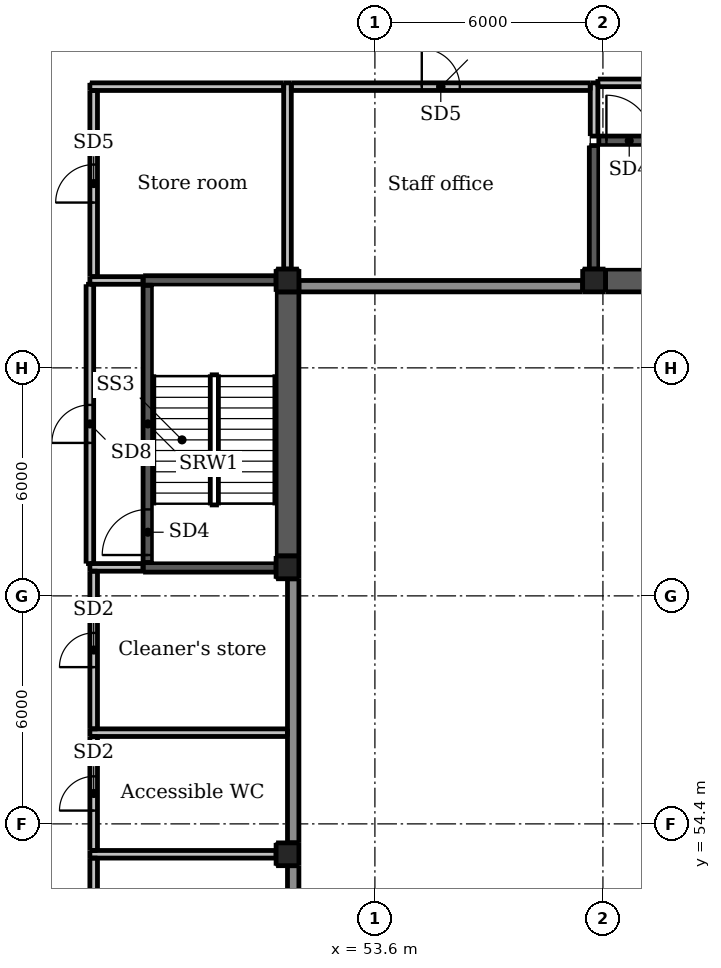
"""IFC4 building model, lengths in metres.
Left out: names, types, materials, properties, quantities, classifications, styles, units other than length and angle.
Written with IfcOpenShell. Run it as: python <this file> out.ifc"""

import sys

from ifc_helpers import new_model, si_unit, direction, frame, frame_2d, origin, origin_2d, place, context, subcontext, project, spatial, rectangle, extrude, element, fill, save


model = new_model("IFC4")
c1 = context("Model", 3, precision=1e-05, world=origin(), true_north=direction((0.0, 1.0)))
c2 = subcontext(c1, "Body", "Model", "MODEL_VIEW")
j1 = project(units=[si_unit("LENGTHUNIT", "METRE"), si_unit("PLANEANGLEUNIT", "RADIAN")], contexts=[c1])
p1 = place(None, origin())
s1 = spatial("IfcSite", under=j1, at=p1, CompositionType="ELEMENT")
p2 = place(p1, origin())
s2 = spatial("IfcBuilding", under=s1, at=p2, CompositionType="ELEMENT")
p3 = place(p2, frame((0.0, 0.0, 19.0)))
s3 = spatial("IfcBuildingStorey", under=s2, at=p3, CompositionType="ELEMENT", Elevation=19.0)
for number, where, z_axis, x_axis in (
    (1, (59.6, 67.4, 0.0), (0.0, 0.0, 1.0), (1.0, 0.0, 0.0)),
    (2, (52.6, 54.4, 0.0), (0.0, 0.0, 1.0), (1.0, 0.0, 0.0)),
    (3, (52.6, 60.4, 0.0), (0.0, 0.0, 1.0), (1.0, 0.0, 0.0)),
):
    element("IfcColumn", number, at=place(p3, frame(where, z_axis=z_axis, x_axis=x_axis)), inside=s3, PredefinedType="COLUMN", context=c2, shape_type="SweptSolid", body=[
        extrude(rectangle(XDim=1.2, YDim=1.2, at=origin_2d()), origin(), (0.0, 0.0, 1.0), 4.25),
    ])
p4 = place(p3, frame((55.2, 64.8, 0.0), z_axis=(0.0, 0.0, 1.0), x_axis=(1.0, 0.0, 0.0)))
e4 = element("IfcColumn", 4, at=p4, inside=s3, PredefinedType="COLUMN", context=c2, shape_type="SweptSolid", body=[
    extrude(rectangle(XDim=3.2, YDim=3.2, at=origin_2d()), origin(), (0.0, 0.0, 1.0), 4.25),
])
for number, where, z_axis, x_axis in (
    (5, (51.3, 53.6, -0.3), (0.0, 0.0, 1.0), (1.0, 0.0, 0.0)),
    (6, (51.3, 61.15, -0.3), (0.0, 0.0, 1.0), (1.0, 0.0, 0.0)),
    (7, (51.3, 68.7, -0.3), (0.0, 0.0, 1.0), (1.0, 0.0, 0.0)),
    (8, (59.367, 68.7, -0.3), (0.0, 0.0, 1.0), (1.0, 0.0, 0.0)),
):
    element("IfcColumn", number, at=place(p3, frame(where, z_axis=z_axis, x_axis=x_axis)), inside=s3, PredefinedType="COLUMN", context=c2, shape_type="SweptSolid", body=[
        extrude(rectangle(XDim=0.6, YDim=0.6, at=origin_2d()), origin(), (0.0, 0.0, 1.0), 4.35),
    ])
p5 = place(p3, frame((47.625, 61.275, -0.3), z_axis=(0.0, 0.0, 1.0), x_axis=(0.0, 1.0, 0.0)))
e9 = element("IfcWall", 9, at=p5, inside=s3, PredefinedType="SHEAR", context=c2, shape_type="SweptSolid", body=[
    extrude(rectangle(XDim=7.3, YDim=0.25, at=frame_2d((3.65, 0.0))), origin(), (0.0, 0.0, 1.0), 4.8),
])
p6 = place(p5, frame((0.2, 0.0, 0.3)))
e10 = element("IfcOpeningElement", 10, at=p6, cuts=e9, PredefinedType="OPENING", context=c2, shape_type="SweptSolid", body=[
    extrude(rectangle(XDim=1.2, YDim=2.1, at=frame_2d((0.6, 1.05))), frame((0.0, 0.135, 0.0), z_axis=(0.0, -1.0, 0.0), x_axis=(1.0, 0.0, 0.0)), (0.0, 0.0, 1.0), 0.27),
])
for number, where, z_axis, x_axis in (
    (11, (47.5, 61.15, -0.3), (0.0, 0.0, 1.0), (1.0, 0.0, 0.0)),
    (12, (47.5, 68.7, -0.3), (0.0, 0.0, 1.0), (1.0, 0.0, 0.0)),
):
    element("IfcWall", number, at=place(p3, frame(where, z_axis=z_axis, x_axis=x_axis)), inside=s3, PredefinedType="SHEAR", context=c2, shape_type="SweptSolid", body=[
        extrude(rectangle(XDim=3.5, YDim=0.25, at=frame_2d((1.75, 0.0))), origin(), (0.0, 0.0, 1.0), 4.8),
    ])
p7 = place(p3, frame((51.3, 61.45, -0.3), z_axis=(0.0, 0.0, 1.0), x_axis=(0.0, 1.0, 0.0)))
e13 = element("IfcWall", 13, at=p7, inside=s3, PredefinedType="SHEAR", context=c2, shape_type="SweptSolid", body=[
    extrude(rectangle(XDim=6.95, YDim=0.6, at=frame_2d((3.475, 0.0))), origin(), (0.0, 0.0, 1.0), 4.8),
])
p8 = place(p3, frame((59.492, 72.375, -0.3), z_axis=(0.0, 0.0, 1.0), x_axis=(1.0, 0.0, 0.0)))
e14 = element("IfcWall", 14, at=p8, inside=s3, PredefinedType="SHEAR", context=c2, shape_type="SweptSolid", body=[
    extrude(rectangle(XDim=7.816, YDim=0.25, at=frame_2d((3.908, 0.0))), origin(), (0.0, 0.0, 1.0), 4.8),
])
p9 = place(p8, frame((0.2, 0.0, 0.3)))
e15 = element("IfcOpeningElement", 15, at=p9, cuts=e14, PredefinedType="OPENING", context=c2, shape_type="SweptSolid", body=[
    extrude(rectangle(XDim=1.2, YDim=2.1, at=frame_2d((0.6, 1.05))), frame((0.0, 0.135, 0.0), z_axis=(0.0, -1.0, 0.0), x_axis=(1.0, 0.0, 0.0)), (0.0, 0.0, 1.0), 0.27),
])
p10 = place(p3, frame((59.367, 69.0, -0.3), z_axis=(0.0, 0.0, 1.0), x_axis=(0.0, 1.0, 0.0)))
e16 = element("IfcWall", 16, at=p10, inside=s3, PredefinedType="SHEAR", context=c2, shape_type="SweptSolid", body=[
    extrude(rectangle(XDim=3.25, YDim=0.25, at=frame_2d((1.625, 0.0))), origin(), (0.0, 0.0, 1.0), 4.8),
])
p11 = place(p3, frame((59.667, 68.7, -0.3), z_axis=(0.0, 0.0, 1.0), x_axis=(1.0, 0.0, 0.0)))
e17 = element("IfcWall", 17, at=p11, inside=s3, PredefinedType="SHEAR", context=c2, shape_type="SweptSolid", body=[
    extrude(rectangle(XDim=7.466, YDim=0.6, at=frame_2d((3.733, 0.0))), origin(), (0.0, 0.0, 1.0), 4.8),
])
p12 = place(p3, frame((52.0, 67.875, 0.0), z_axis=(0.0, 0.0, 1.0), x_axis=(1.0, 0.0, 0.0)))
e18 = element("IfcWall", 18, at=p12, inside=s3, PredefinedType="SOLIDWALL", context=c2, shape_type="SweptSolid", body=[
    extrude(rectangle(XDim=7.0, YDim=0.25, at=frame_2d((3.5, 0.0))), origin(), (0.0, 0.0, 1.0), 4.25),
])
for number, where, z_axis, x_axis in (
    (19, (60.2, 67.875, 0.0), (0.0, 0.0, 1.0), (1.0, 0.0, 0.0)),
    (20, (52.125, 49.0, 0.0), (0.0, 0.0, 1.0), (0.0, 1.0, 0.0)),
    (21, (52.125, 55.0, 0.0), (0.0, 0.0, 1.0), (0.0, 1.0, 0.0)),
):
    element("IfcWall", number, at=place(p3, frame(where, z_axis=z_axis, x_axis=x_axis)), inside=s3, PredefinedType="SOLIDWALL", context=c2, shape_type="SweptSolid", body=[
        extrude(rectangle(XDim=4.8, YDim=0.25, at=frame_2d((2.4, 0.0))), origin(), (0.0, 0.0, 1.0), 4.25),
    ])
p13 = place(p3, frame((52.125, 61.0, 0.0), z_axis=(0.0, 0.0, 1.0), x_axis=(0.0, 1.0, 0.0)))
e22 = element("IfcWall", 22, at=p13, inside=s3, PredefinedType="SOLIDWALL", context=c2, shape_type="SweptSolid", body=[
    extrude(rectangle(XDim=7.0, YDim=0.25, at=frame_2d((3.5, 0.0))), origin(), (0.0, 0.0, 1.0), 4.25),
])
p14 = place(p3, frame((51.45, 46.35, 0.0), z_axis=(0.0, 0.0, 1.0), x_axis=(0.0, 1.0, 0.0)))
e23 = element("IfcWall", 23, at=p14, inside=s3, PredefinedType="SOLIDWALL", context=c2, shape_type="SweptSolid", body=[
    extrude(rectangle(XDim=6.95, YDim=0.3, at=frame_2d((3.475, 0.0))), origin(), (0.0, 0.0, 1.0), 3.15),
])
p15 = place(p3, frame((51.45, 53.9, 0.0), z_axis=(0.0, 0.0, 1.0), x_axis=(0.0, 1.0, 0.0)))
e24 = element("IfcWall", 24, at=p15, inside=s3, PredefinedType="SOLIDWALL", context=c2, shape_type="SweptSolid", body=[
    extrude(rectangle(XDim=6.95, YDim=0.3, at=frame_2d((3.475, 0.0))), origin(), (0.0, 0.0, 1.0), 3.15),
])
p16 = place(p3, frame((51.6, 68.55, 0.0), z_axis=(0.0, 0.0, 1.0), x_axis=(1.0, 0.0, 0.0)))
e25 = element("IfcWall", 25, at=p16, inside=s3, PredefinedType="SOLIDWALL", context=c2, shape_type="SweptSolid", body=[
    extrude(rectangle(XDim=7.467, YDim=0.3, at=frame_2d((3.733, 0.0))), origin(), (0.0, 0.0, 1.0), 3.15),
])
p17 = place(p3, frame((53.2, 54.4, 0.0), z_axis=(0.0, 0.0, 1.0), x_axis=(1.0, 0.0, 0.0)))
e26 = element("IfcWall", 26, at=p17, inside=s3, PredefinedType="PARTITIONING", context=c2, shape_type="SweptSolid", body=[
    extrude(rectangle(XDim=6.325, YDim=0.1, at=frame_2d((3.163, 0.0))), origin(), (0.0, 0.0, 1.0), 3.409),
])
p18 = place(p3, frame((53.2, 60.4, 0.0), z_axis=(0.0, 0.0, 1.0), x_axis=(1.0, 0.0, 0.0)))
e27 = element("IfcWall", 27, at=p18, inside=s3, PredefinedType="PARTITIONING", context=c2, shape_type="SweptSolid", body=[
    extrude(rectangle(XDim=5.95, YDim=0.15, at=frame_2d((2.975, 0.0))), origin(), (0.0, 0.0, 1.0), 3.415),
])
p19 = place(p3, frame((59.15, 60.4, 0.0), z_axis=(0.0, 0.0, 1.0), x_axis=(1.0, 0.0, 0.0)))
e28 = element("IfcWall", 28, at=p19, inside=s3, PredefinedType="PARTITIONING", context=c2, shape_type="SweptSolid", body=[
    extrude(rectangle(XDim=0.9, YDim=0.15, at=frame_2d((0.45, 0.0))), origin(), (0.0, 0.0, 1.0), 2.947),
])
p20 = place(p3, frame((60.05, 60.4, 0.0), z_axis=(0.0, 0.0, 1.0), x_axis=(1.0, 0.0, 0.0)))
e29 = element("IfcWall", 29, at=p20, inside=s3, PredefinedType="PARTITIONING", context=c2, shape_type="SweptSolid", body=[
    extrude(rectangle(XDim=5.404, YDim=0.15, at=frame_2d((2.702, 0.0))), origin(), (0.0, 0.0, 1.0), 4.25),
])
p21 = place(p3, frame((59.6, 48.546, 0.0), z_axis=(0.0, 0.0, 1.0), x_axis=(0.0, 1.0, 0.0)))
e30 = element("IfcWall", 30, at=p21, inside=s3, PredefinedType="PARTITIONING", context=c2, shape_type="SweptSolid", body=[
    extrude(rectangle(XDim=5.708, YDim=0.15, at=frame_2d((2.854, 0.0))), origin(), (0.0, 0.0, 1.0), 4.25),
])
p22 = place(p21, frame((0.204, 0.0, 0.0)))
e31 = element("IfcOpeningElement", 31, at=p22, cuts=e30, PredefinedType="OPENING", context=c2, shape_type="SweptSolid", body=[
    extrude(rectangle(XDim=1.8, YDim=2.1, at=frame_2d((0.9, 1.05))), frame((0.0, 0.085, 0.0), z_axis=(0.0, -1.0, 0.0), x_axis=(1.0, 0.0, 0.0)), (0.0, 0.0, 1.0), 0.17),
])
p23 = place(p3, frame((59.6, 54.254, 0.0), z_axis=(0.0, 0.0, 1.0), x_axis=(0.0, 1.0, 0.0)))
e32 = element("IfcWall", 32, at=p23, inside=s3, PredefinedType="PARTITIONING", context=c2, shape_type="SweptSolid", body=[
    extrude(rectangle(XDim=0.287, YDim=0.15, at=frame_2d((0.143, 0.0))), origin(), (0.0, 0.0, 1.0), 3.409),
])
p24 = place(p3, frame((59.6, 54.546, 0.0), z_axis=(0.0, 0.0, 1.0), x_axis=(0.0, 1.0, 0.0)))
e33 = element("IfcWall", 33, at=p24, inside=s3, PredefinedType="PARTITIONING", context=c2, shape_type="SweptSolid", body=[
    extrude(rectangle(XDim=5.779, YDim=0.15, at=frame_2d((2.89, 0.0))), origin(), (0.0, 0.0, 1.0), 2.947),
])
p25 = place(p24, frame((2.354, 0.0, 0.0)))
e34 = element("IfcOpeningElement", 34, at=p25, cuts=e33, PredefinedType="OPENING", context=c2, shape_type="SweptSolid", body=[
    extrude(rectangle(XDim=1.0, YDim=2.1, at=frame_2d((0.5, 1.05))), frame((0.0, 0.085, 0.0), z_axis=(0.0, -1.0, 0.0), x_axis=(1.0, 0.0, 0.0)), (0.0, 0.0, 1.0), 0.17),
])
p26 = place(p3, frame((46.2, 46.15, 0.0), z_axis=(0.0, 0.0, 1.0), x_axis=(0.0, 1.0, 0.0)))
e35 = element("IfcWall", 35, at=p26, inside=s3, PredefinedType="PARTITIONING", context=c2, shape_type="SweptSolid", body=[
    extrude(rectangle(XDim=7.35, YDim=0.2, at=frame_2d((3.675, 0.0))), origin(), (0.0, 0.0, 1.0), 2.85),
])
p27 = place(p26, frame((3.225, 0.0, 0.0)))
e36 = element("IfcOpeningElement", 36, at=p27, cuts=e35, PredefinedType="OPENING", context=c2, shape_type="SweptSolid", body=[
    extrude(rectangle(XDim=0.9, YDim=2.1, at=frame_2d((0.45, 1.05))), frame((0.0, 0.11, 0.0), z_axis=(0.0, -1.0, 0.0), x_axis=(1.0, 0.0, 0.0)), (0.0, 0.0, 1.0), 0.22),
])
p28 = place(p3, frame((46.2, 53.7, 0.0), z_axis=(0.0, 0.0, 1.0), x_axis=(0.0, 1.0, 0.0)))
e37 = element("IfcWall", 37, at=p28, inside=s3, PredefinedType="PARTITIONING", context=c2, shape_type="SweptSolid", body=[
    extrude(rectangle(XDim=3.0, YDim=0.2, at=frame_2d((1.5, 0.0))), origin(), (0.0, 0.0, 1.0), 2.85),
])
p29 = place(p28, frame((1.05, 0.0, 0.0)))
e38 = element("IfcOpeningElement", 38, at=p29, cuts=e37, PredefinedType="OPENING", context=c2, shape_type="SweptSolid", body=[
    extrude(rectangle(XDim=0.9, YDim=2.1, at=frame_2d((0.45, 1.05))), frame((0.0, 0.11, 0.0), z_axis=(0.0, -1.0, 0.0), x_axis=(1.0, 0.0, 0.0)), (0.0, 0.0, 1.0), 0.22),
])
p30 = place(p3, frame((46.2, 56.9, 0.0), z_axis=(0.0, 0.0, 1.0), x_axis=(0.0, 1.0, 0.0)))
e39 = element("IfcWall", 39, at=p30, inside=s3, PredefinedType="PARTITIONING", context=c2, shape_type="SweptSolid", body=[
    extrude(rectangle(XDim=4.15, YDim=0.2, at=frame_2d((2.075, 0.0))), origin(), (0.0, 0.0, 1.0), 2.85),
])
p31 = place(p30, frame((1.625, 0.0, 0.0)))
e40 = element("IfcOpeningElement", 40, at=p31, cuts=e39, PredefinedType="OPENING", context=c2, shape_type="SweptSolid", body=[
    extrude(rectangle(XDim=0.9, YDim=2.1, at=frame_2d((0.45, 1.05))), frame((0.0, 0.11, 0.0), z_axis=(0.0, -1.0, 0.0), x_axis=(1.0, 0.0, 0.0)), (0.0, 0.0, 1.0), 0.22),
])
p32 = place(p3, frame((46.2, 68.8, 0.0), z_axis=(0.0, 0.0, 1.0), x_axis=(0.0, 1.0, 0.0)))
e41 = element("IfcWall", 41, at=p32, inside=s3, PredefinedType="PARTITIONING", context=c2, shape_type="SweptSolid", body=[
    extrude(rectangle(XDim=4.9, YDim=0.2, at=frame_2d((2.45, 0.0))), origin(), (0.0, 0.0, 1.0), 2.85),
])
p33 = place(p32, frame((1.95, 0.0, 0.0)))
e42 = element("IfcOpeningElement", 42, at=p33, cuts=e41, PredefinedType="OPENING", context=c2, shape_type="SweptSolid", body=[
    extrude(rectangle(XDim=1.0, YDim=2.1, at=frame_2d((0.5, 1.05))), frame((0.0, 0.11, 0.0), z_axis=(0.0, -1.0, 0.0), x_axis=(1.0, 0.0, 0.0)), (0.0, 0.0, 1.0), 0.22),
])
p34 = place(p3, frame((46.1, 53.6, 0.0), z_axis=(0.0, 0.0, 1.0), x_axis=(1.0, 0.0, 0.0)))
e43 = element("IfcWall", 43, at=p34, inside=s3, PredefinedType="PARTITIONING", context=c2, shape_type="SweptSolid", body=[
    extrude(rectangle(XDim=4.9, YDim=0.2, at=frame_2d((2.45, 0.0))), origin(), (0.0, 0.0, 1.0), 2.85),
])
for number, where, z_axis, x_axis in (
    (44, (46.1, 61.15, 0.0), (0.0, 0.0, 1.0), (1.0, 0.0, 0.0)),
    (45, (46.1, 68.7, 0.0), (0.0, 0.0, 1.0), (1.0, 0.0, 0.0)),
):
    element("IfcWall", number, at=place(p3, frame(where, z_axis=z_axis, x_axis=x_axis)), inside=s3, PredefinedType="PARTITIONING", context=c2, shape_type="SweptSolid", body=[
        extrude(rectangle(XDim=1.4, YDim=0.2, at=frame_2d((0.7, 0.0))), origin(), (0.0, 0.0, 1.0), 2.85),
    ])
p35 = place(p3, frame((46.1, 56.8, 0.0), z_axis=(0.0, 0.0, 1.0), x_axis=(1.0, 0.0, 0.0)))
e46 = element("IfcWall", 46, at=p35, inside=s3, PredefinedType="PARTITIONING", context=c2, shape_type="SweptSolid", body=[
    extrude(rectangle(XDim=5.2, YDim=0.2, at=frame_2d((2.6, 0.0))), origin(), (0.0, 0.0, 1.0), 2.85),
])
p36 = place(p3, frame((51.4, 73.8, 0.0), z_axis=(0.0, 0.0, 1.0), x_axis=(1.0, 0.0, 0.0)))
e47 = element("IfcWall", 47, at=p36, inside=s3, PredefinedType="PARTITIONING", context=c2, shape_type="SweptSolid", body=[
    extrude(rectangle(XDim=7.867, YDim=0.2, at=frame_2d((3.934, 0.0))), origin(), (0.0, 0.0, 1.0), 2.85),
])
p37 = place(p36, frame((3.434, 0.0, 0.0)))
e48 = element("IfcOpeningElement", 48, at=p37, cuts=e47, PredefinedType="OPENING", context=c2, shape_type="SweptSolid", body=[
    extrude(rectangle(XDim=1.0, YDim=2.1, at=frame_2d((0.5, 1.05))), frame((0.0, 0.11, 0.0), z_axis=(0.0, -1.0, 0.0), x_axis=(1.0, 0.0, 0.0)), (0.0, 0.0, 1.0), 0.22),
])
p38 = place(p3, frame((59.367, 72.5, 0.0), z_axis=(0.0, 0.0, 1.0), x_axis=(0.0, 1.0, 0.0)))
e49 = element("IfcWall", 49, at=p38, inside=s3, PredefinedType="PARTITIONING", context=c2, shape_type="SweptSolid", body=[
    extrude(rectangle(XDim=1.4, YDim=0.2, at=frame_2d((0.7, 0.0))), origin(), (0.0, 0.0, 1.0), 2.85),
])
p39 = place(p3, frame((46.1, 73.8, 0.0), z_axis=(0.0, 0.0, 1.0), x_axis=(1.0, 0.0, 0.0)))
e50 = element("IfcWall", 50, at=p39, inside=s3, PredefinedType="PARTITIONING", context=c2, shape_type="SweptSolid", body=[
    extrude(rectangle(XDim=5.1, YDim=0.2, at=frame_2d((2.55, 0.0))), origin(), (0.0, 0.0, 1.0), 2.85),
])
p40 = place(p3, frame((51.3, 69.0, 0.0), z_axis=(0.0, 0.0, 1.0), x_axis=(0.0, 1.0, 0.0)))
e51 = element("IfcWall", 51, at=p40, inside=s3, PredefinedType="PARTITIONING", context=c2, shape_type="SweptSolid", body=[
    extrude(rectangle(XDim=4.9, YDim=0.2, at=frame_2d((2.45, 0.0))), origin(), (0.0, 0.0, 1.0), 2.85),
])
p41 = place(p3, frame((46.1, 61.25, 0.0), z_axis=(0.0, 0.0, 1.0), x_axis=(0.0, 1.0, 0.0)))
e52 = element("IfcWall", 52, at=p41, inside=s3, PredefinedType="PARTITIONING", context=c2, shape_type="SweptSolid", body=[
    extrude(rectangle(XDim=7.35, YDim=0.2, at=frame_2d((3.675, 0.0))), origin(), (0.0, 0.0, 1.0), 2.85),
])
p42 = place(p41, frame((3.175, 0.0, 0.0)))
e53 = element("IfcOpeningElement", 53, at=p42, cuts=e52, PredefinedType="OPENING", context=c2, shape_type="SweptSolid", body=[
    extrude(rectangle(XDim=1.0, YDim=2.1, at=frame_2d((0.5, 1.05))), frame((0.0, 0.11, 0.0), z_axis=(0.0, -1.0, 0.0), x_axis=(1.0, 0.0, 0.0)), (0.0, 0.0, 1.0), 0.22),
])
p43 = place(p3, frame((59.467, 73.9, 0.0), z_axis=(0.0, 0.0, 1.0), x_axis=(1.0, 0.0, 0.0)))
e54 = element("IfcWall", 54, at=p43, inside=s3, PredefinedType="PARTITIONING", context=c2, shape_type="SweptSolid", body=[
    extrude(rectangle(XDim=7.866, YDim=0.2, at=frame_2d((3.933, 0.0))), origin(), (0.0, 0.0, 1.0), 2.85),
])
p44 = place(p43, frame((3.433, 0.0, 0.0)))
e55 = element("IfcOpeningElement", 55, at=p44, cuts=e54, PredefinedType="OPENING", context=c2, shape_type="SweptSolid", body=[
    extrude(rectangle(XDim=1.0, YDim=2.1, at=frame_2d((0.5, 1.05))), frame((0.0, 0.11, 0.0), z_axis=(0.0, -1.0, 0.0), x_axis=(1.0, 0.0, 0.0)), (0.0, 0.0, 1.0), 0.22),
])
p45 = place(p25, origin())
e56 = element("IfcDoor", 56, at=p45, inside=s3, OperationType="SINGLE_SWING_LEFT", PredefinedType="DOOR", context=c2, shape_type="SweptSolid", body=[
    extrude(rectangle(XDim=1.0, YDim=2.1, at=frame_2d((0.5, 1.05))), frame((0.0, 0.025, 0.0), z_axis=(0.0, -1.0, 0.0), x_axis=(1.0, 0.0, 0.0)), (0.0, 0.0, 1.0), 0.05),
])
fill(e34, e56)
p46 = place(p29, origin())
e57 = element("IfcDoor", 57, at=p46, inside=s3, OperationType="SINGLE_SWING_LEFT", PredefinedType="DOOR", context=c2, shape_type="SweptSolid", body=[
    extrude(rectangle(XDim=0.9, YDim=2.1, at=frame_2d((0.45, 1.05))), frame((0.0, 0.025, 0.0), z_axis=(0.0, -1.0, 0.0), x_axis=(1.0, 0.0, 0.0)), (0.0, 0.0, 1.0), 0.05),
])
fill(e38, e57)
p47 = place(p31, origin())
e58 = element("IfcDoor", 58, at=p47, inside=s3, OperationType="SINGLE_SWING_LEFT", PredefinedType="DOOR", context=c2, shape_type="SweptSolid", body=[
    extrude(rectangle(XDim=0.9, YDim=2.1, at=frame_2d((0.45, 1.05))), frame((0.0, 0.025, 0.0), z_axis=(0.0, -1.0, 0.0), x_axis=(1.0, 0.0, 0.0)), (0.0, 0.0, 1.0), 0.05),
])
fill(e40, e58)
p48 = place(p33, origin())
e59 = element("IfcDoor", 59, at=p48, inside=s3, OperationType="SINGLE_SWING_LEFT", PredefinedType="DOOR", context=c2, shape_type="SweptSolid", body=[
    extrude(rectangle(XDim=1.0, YDim=2.1, at=frame_2d((0.5, 1.05))), frame((0.0, 0.025, 0.0), z_axis=(0.0, -1.0, 0.0), x_axis=(1.0, 0.0, 0.0)), (0.0, 0.0, 1.0), 0.05),
])
fill(e42, e59)
p49 = place(p37, origin())
e60 = element("IfcDoor", 60, at=p49, inside=s3, OperationType="SINGLE_SWING_LEFT", PredefinedType="DOOR", context=c2, shape_type="SweptSolid", body=[
    extrude(rectangle(XDim=1.0, YDim=2.1, at=frame_2d((0.5, 1.05))), frame((0.0, 0.025, 0.0), z_axis=(0.0, -1.0, 0.0), x_axis=(1.0, 0.0, 0.0)), (0.0, 0.0, 1.0), 0.05),
])
fill(e48, e60)
p50 = place(p42, origin())
e61 = element("IfcDoor", 61, at=p50, inside=s3, OperationType="SINGLE_SWING_LEFT", PredefinedType="DOOR", context=c2, shape_type="SweptSolid", body=[
    extrude(rectangle(XDim=1.0, YDim=2.1, at=frame_2d((0.5, 1.05))), frame((0.0, 0.025, 0.0), z_axis=(0.0, -1.0, 0.0), x_axis=(1.0, 0.0, 0.0)), (0.0, 0.0, 1.0), 0.05),
])
fill(e53, e61)
p51 = place(p6, origin())
e62 = element("IfcDoor", 62, at=p51, inside=s3, OperationType="SINGLE_SWING_LEFT", PredefinedType="DOOR", context=c2, shape_type="SweptSolid", body=[
    extrude(rectangle(XDim=1.2, YDim=2.1, at=frame_2d((0.6, 1.05))), frame((0.0, 0.025, 0.0), z_axis=(0.0, -1.0, 0.0), x_axis=(1.0, 0.0, 0.0)), (0.0, 0.0, 1.0), 0.05),
])
fill(e10, e62)
p52 = place(p9, origin())
e63 = element("IfcDoor", 63, at=p52, inside=s3, OperationType="SINGLE_SWING_LEFT", PredefinedType="DOOR", context=c2, shape_type="SweptSolid", body=[
    extrude(rectangle(XDim=1.2, YDim=2.1, at=frame_2d((0.6, 1.05))), frame((0.0, 0.025, 0.0), z_axis=(0.0, -1.0, 0.0), x_axis=(1.0, 0.0, 0.0)), (0.0, 0.0, 1.0), 0.05),
])
fill(e15, e63)
save(model, sys.argv[1])
